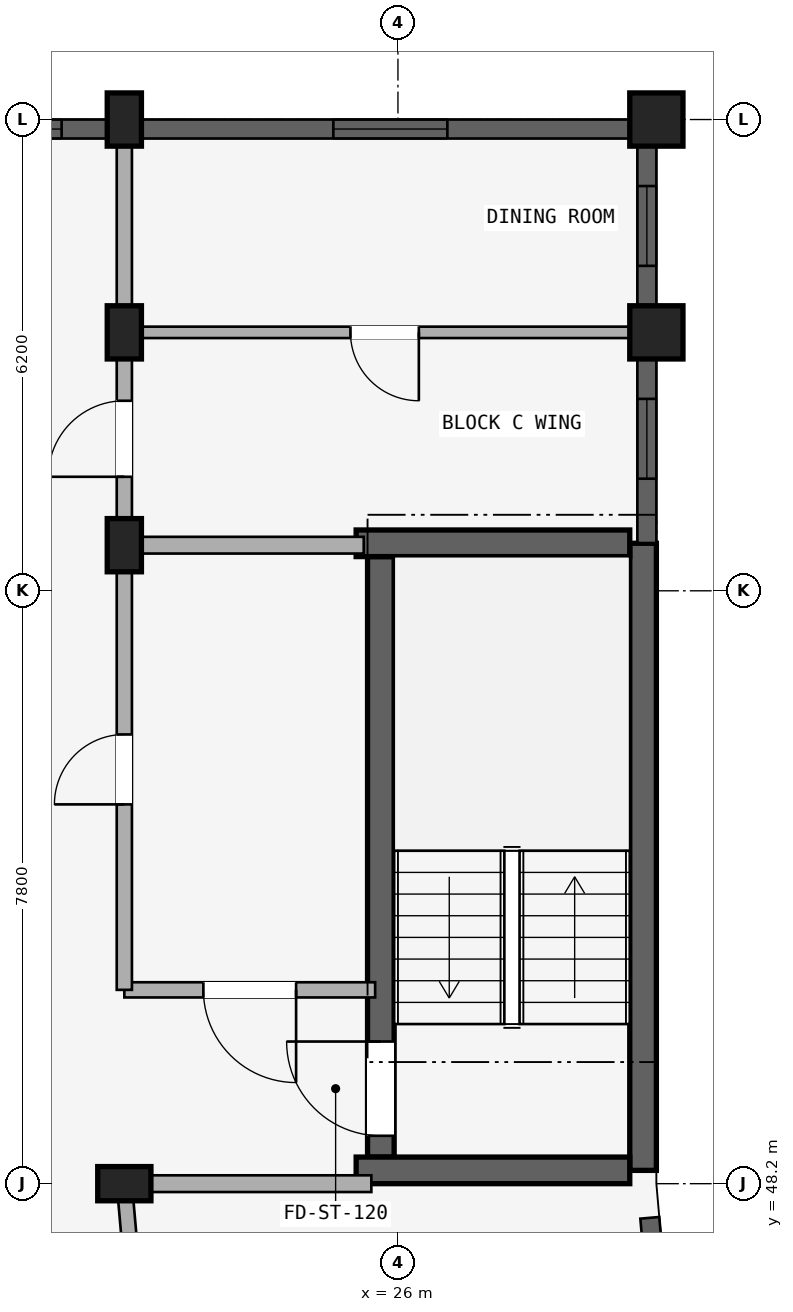
"""IFC4 building model, lengths in metres.
Left out: names, types, materials, properties, quantities, classifications, styles, units other than length and angle.
Written with IfcOpenShell. Run it as: python <this file> out.ifc"""

import sys

from ifc_helpers import new_model, si_unit, direction, frame, frame_2d, origin, origin_2d, place, context, subcontext, project, spatial, rectangle, extrude, element, fill, save


model = new_model("IFC4")
c1 = context("Model", 3, precision=1e-05, world=origin(), true_north=direction((0.0, 1.0)))
c2 = subcontext(c1, "Body", "Model", "MODEL_VIEW")
j1 = project(units=[si_unit("LENGTHUNIT", "METRE"), si_unit("PLANEANGLEUNIT", "RADIAN")], contexts=[c1])
p1 = place(None, origin())
s1 = spatial("IfcSite", under=j1, at=p1, CompositionType="ELEMENT")
p2 = place(p1, origin())
s2 = spatial("IfcBuilding", under=s1, at=p2, CompositionType="ELEMENT")
p3 = place(p2, frame((0.0, 0.0, 21.3)))
s3 = spatial("IfcBuildingStorey", under=s2, at=p3, CompositionType="ELEMENT", Elevation=21.3)
p4 = place(p3, frame((29.225, 48.375, 0.0), z_axis=(0.0, 0.0, 1.0), x_axis=(0.0, 1.0, 0.0)))
e1 = element("IfcWall", 1, at=p4, inside=s3, PredefinedType="SHEAR", context=c2, shape_type="SweptSolid", body=[
    extrude(rectangle(XDim=8.25, YDim=0.35, at=frame_2d((4.125, 0.0))), origin(), (0.0, 0.0, 1.0), 2.93),
])
p5 = place(p3, frame((25.775, 48.55, 0.0), z_axis=(0.0, 0.0, 1.0), x_axis=(0.0, 1.0, 0.0)))
e2 = element("IfcWall", 2, at=p5, inside=s3, PredefinedType="SHEAR", context=c2, shape_type="SweptSolid", body=[
    extrude(rectangle(XDim=7.9, YDim=0.35, at=frame_2d((3.95, 0.0))), origin(), (0.0, 0.0, 1.0), 2.93),
])
p6 = place(p5, frame((0.28, 0.0, 0.0)))
e3 = element("IfcOpeningElement", 3, at=p6, cuts=e2, PredefinedType="OPENING", context=c2, shape_type="SweptSolid", body=[
    extrude(rectangle(XDim=1.24, YDim=2.15, at=frame_2d((0.62, 1.075))), frame((0.0, 0.185, 0.0), z_axis=(0.0, -1.0, 0.0), x_axis=(1.0, 0.0, 0.0)), (0.0, 0.0, 1.0), 0.37),
])
for number, where, z_axis, x_axis in (
    (4, (29.05, 48.375, 0.0), (0.0, 0.0, 1.0), (-1.0, 0.0, 0.0)),
    (5, (29.05, 56.625, 0.0), (0.0, 0.0, 1.0), (-1.0, 0.0, 0.0)),
):
    element("IfcWall", number, at=place(p3, frame(where, z_axis=z_axis, x_axis=x_axis)), inside=s3, PredefinedType="SHEAR", context=c2, shape_type="SweptSolid", body=[
        extrude(rectangle(XDim=3.6, YDim=0.35, at=frame_2d((1.8, 0.0))), origin(), (0.0, 0.0, 1.0), 2.93),
    ])
for number, where, z_axis, x_axis in (
    (6, (22.4, 48.2, 0.0), (0.0, 0.0, 1.0), (0.0, 1.0, 0.0)),
    (7, (22.4, 56.6, 0.0), (0.0, 0.0, 1.0), (1.0, 0.0, 0.0)),
):
    element("IfcColumn", number, at=place(p3, frame(where, z_axis=z_axis, x_axis=x_axis)), inside=s3, PredefinedType="COLUMN", context=c2, shape_type="SweptSolid", body=[
        extrude(rectangle(XDim=0.45, YDim=0.7, at=origin_2d()), origin(), (0.0, 0.0, 1.0), 2.93),
    ])
p7 = place(p3, frame((29.4, 59.4, 0.0), z_axis=(0.0, 0.0, 1.0), x_axis=(1.0, 0.0, 0.0)))
e8 = element("IfcColumn", 8, at=p7, inside=s3, PredefinedType="COLUMN", context=c2, shape_type="SweptSolid", body=[
    extrude(rectangle(XDim=0.7, YDim=0.7, at=origin_2d()), origin(), (0.0, 0.0, 1.0), 2.93),
])
p8 = place(p3, frame((22.4, 59.4, 0.0), z_axis=(0.0, 0.0, 1.0), x_axis=(1.0, 0.0, 0.0)))
e9 = element("IfcColumn", 9, at=p8, inside=s3, PredefinedType="COLUMN", context=c2, shape_type="SweptSolid", body=[
    extrude(rectangle(XDim=0.45, YDim=0.7, at=origin_2d()), origin(), (0.0, 0.0, 1.0), 2.93),
])
p9 = place(p3, frame((29.4, 62.2, 0.0), z_axis=(0.0, 0.0, 1.0), x_axis=(1.0, 0.0, 0.0)))
e10 = element("IfcColumn", 10, at=p9, inside=s3, PredefinedType="COLUMN", context=c2, shape_type="SweptSolid", body=[
    extrude(rectangle(XDim=0.7, YDim=0.7, at=origin_2d()), origin(), (0.0, 0.0, 1.0), 2.93),
])
p10 = place(p3, frame((22.4, 62.2, 0.0), z_axis=(0.0, 0.0, 1.0), x_axis=(1.0, 0.0, 0.0)))
e11 = element("IfcColumn", 11, at=p10, inside=s3, PredefinedType="COLUMN", context=c2, shape_type="SweptSolid", body=[
    extrude(rectangle(XDim=0.45, YDim=0.7, at=origin_2d()), origin(), (0.0, 0.0, 1.0), 2.93),
])
p11 = place(p3, frame((25.7, 50.75, 0.0), z_axis=(0.0, 0.0, 1.0), x_axis=(-1.0, 0.0, 0.0)))
e12 = element("IfcWall", 12, at=p11, inside=s3, PredefinedType="STANDARD", context=c2, shape_type="SweptSolid", body=[
    extrude(rectangle(XDim=3.3, YDim=0.2, at=frame_2d((1.65, 0.0))), origin(), (0.0, 0.0, 1.0), 2.372),
])
p12 = place(p11, frame((1.04, 0.0, 0.0)))
e13 = element("IfcOpeningElement", 13, at=p12, cuts=e12, PredefinedType="OPENING", context=c2, shape_type="SweptSolid", body=[
    extrude(rectangle(XDim=1.22, YDim=2.15, at=frame_2d((0.61, 1.075))), frame((0.0, 0.11, 0.0), z_axis=(0.0, -1.0, 0.0), x_axis=(1.0, 0.0, 0.0)), (0.0, 0.0, 1.0), 0.22),
])
p13 = place(p3, frame((22.4, 50.75, 0.0), z_axis=(0.0, 0.0, 1.0), x_axis=(0.0, 1.0, 0.0)))
e14 = element("IfcWall", 14, at=p13, inside=s3, PredefinedType="STANDARD", context=c2, shape_type="SweptSolid", body=[
    extrude(rectangle(XDim=5.8, YDim=0.2, at=frame_2d((2.9, 0.0))), origin(), (0.0, 0.0, 1.0), 2.372),
])
p14 = place(p13, frame((2.44, 0.0, 0.0)))
e15 = element("IfcOpeningElement", 15, at=p14, cuts=e14, PredefinedType="OPENING", context=c2, shape_type="SweptSolid", body=[
    extrude(rectangle(XDim=0.92, YDim=2.1, at=frame_2d((0.46, 1.05))), frame((0.0, 0.11, 0.0), z_axis=(0.0, -1.0, 0.0), x_axis=(1.0, 0.0, 0.0)), (0.0, 0.0, 1.0), 0.22),
])
p15 = place(p3, frame((22.792, 43.72, 0.0), z_axis=(0.0, 0.0, 1.0), x_axis=(-0.087187153726, 0.996191949488, 0.0)))
e16 = element("IfcWall", 16, at=p15, inside=s3, PredefinedType="STANDARD", context=c2, shape_type="SweptSolid", body=[
    extrude(rectangle(XDim=4.497, YDim=0.2, at=frame_2d((2.249, 0.0))), origin(), (0.0, 0.0, 1.0), 2.372),
])
p16 = place(p3, frame((25.65, 48.2, 0.0), z_axis=(0.0, 0.0, 1.0), x_axis=(-1.0, 0.0, 0.0)))
e17 = element("IfcWall", 17, at=p16, inside=s3, PredefinedType="STANDARD", context=c2, shape_type="SweptSolid", body=[
    extrude(rectangle(XDim=3.2, YDim=0.22, at=frame_2d((1.6, 0.0))), origin(), (0.0, 0.0, 1.0), 2.372),
])
p17 = place(p3, frame((22.4, 56.6, 0.0), z_axis=(0.0, 0.0, 1.0), x_axis=(0.0, 1.0, 0.0)))
e18 = element("IfcWall", 18, at=p17, inside=s3, PredefinedType="STANDARD", context=c2, shape_type="SweptSolid", body=[
    extrude(rectangle(XDim=2.8, YDim=0.2, at=frame_2d((1.4, 0.0))), origin(), (0.0, 0.0, 1.0), 2.372),
])
p18 = place(p17, frame((0.9, 0.0, 0.0)))
e19 = element("IfcOpeningElement", 19, at=p18, cuts=e18, PredefinedType="OPENING", context=c2, shape_type="SweptSolid", body=[
    extrude(rectangle(XDim=1.0, YDim=2.15, at=frame_2d((0.5, 1.075))), frame((0.0, 0.11, 0.0), z_axis=(0.0, -1.0, 0.0), x_axis=(1.0, 0.0, 0.0)), (0.0, 0.0, 1.0), 0.22),
])
p19 = place(p3, frame((25.55, 56.6, 0.0), z_axis=(0.0, 0.0, 1.0), x_axis=(-1.0, 0.0, 0.0)))
e20 = element("IfcWall", 20, at=p19, inside=s3, PredefinedType="STANDARD", context=c2, shape_type="SweptSolid", body=[
    extrude(rectangle(XDim=3.1, YDim=0.22, at=frame_2d((1.55, 0.0))), origin(), (0.0, 0.0, 1.0), 2.372),
])
p20 = place(p3, frame((22.4, 59.4, 0.0), z_axis=(0.0, 0.0, 1.0), x_axis=(0.0, 1.0, 0.0)))
e21 = element("IfcWall", 21, at=p20, inside=s3, PredefinedType="STANDARD", context=c2, shape_type="SweptSolid", body=[
    extrude(rectangle(XDim=2.8, YDim=0.2, at=frame_2d((1.4, 0.0))), origin(), (0.0, 0.0, 1.0), 2.372),
])
p21 = place(p3, frame((29.2, 59.4, 0.0), z_axis=(0.0, 0.0, 1.0), x_axis=(-1.0, 0.0, 0.0)))
e22 = element("IfcWall", 22, at=p21, inside=s3, PredefinedType="PARTITIONING", context=c2, shape_type="SweptSolid", body=[
    extrude(rectangle(XDim=6.75, YDim=0.15, at=frame_2d((3.375, 0.0))), origin(), (0.0, 0.0, 1.0), 2.372),
])
p22 = place(p21, frame((2.925, 0.0, 0.0)))
e23 = element("IfcOpeningElement", 23, at=p22, cuts=e22, PredefinedType="OPENING", context=c2, shape_type="SweptSolid", body=[
    extrude(rectangle(XDim=0.9, YDim=2.1, at=frame_2d((0.45, 1.05))), frame((0.0, 0.085, 0.0), z_axis=(0.0, -1.0, 0.0), x_axis=(1.0, 0.0, 0.0)), (0.0, 0.0, 1.0), 0.17),
])
p23 = place(p3, frame((29.539, 45.177, 0.0), z_axis=(0.0, 0.0, 1.0), x_axis=(-0.087229084652, 0.996188278786, 0.0)))
e24 = element("IfcWall", 24, at=p23, inside=s3, PredefinedType="STANDARD", context=c2, shape_type="SweptSolid", body=[
    extrude(rectangle(XDim=2.583, YDim=0.25, at=frame_2d((1.292, 0.0))), origin(), (0.0, 0.0, 1.0), 2.472),
])
p24 = place(p23, frame((0.785, 0.0, 0.772)))
e25 = element("IfcOpeningElement", 25, at=p24, cuts=e24, PredefinedType="OPENING", context=c2, shape_type="SweptSolid", body=[
    extrude(rectangle(XDim=1.2, YDim=1.5, at=frame_2d((0.6, 0.75))), frame((0.0, 0.135, 0.0), z_axis=(0.0, -1.0, 0.0), x_axis=(1.0, 0.0, 0.0)), (0.0, 0.0, 1.0), 0.27),
])
p25 = place(p3, frame((29.275, 56.628, 0.0), z_axis=(0.0, 0.0, 1.0), x_axis=(0.0, 1.0, 0.0)))
e26 = element("IfcWall", 26, at=p25, inside=s3, PredefinedType="STANDARD", context=c2, shape_type="SweptSolid", body=[
    extrude(rectangle(XDim=2.418, YDim=0.25, at=frame_2d((1.209, 0.0))), origin(), (0.0, 0.0, 1.0), 2.472),
])
p26 = place(p25, frame((0.846, 0.0, 0.88)))
e27 = element("IfcOpeningElement", 27, at=p26, cuts=e26, PredefinedType="OPENING", context=c2, shape_type="SweptSolid", body=[
    extrude(rectangle(XDim=1.05, YDim=1.25, at=frame_2d((0.525, 0.625))), frame((0.0, 0.135, 0.0), z_axis=(0.0, -1.0, 0.0), x_axis=(1.0, 0.0, 0.0)), (0.0, 0.0, 1.0), 0.27),
])
p27 = place(p3, frame((29.275, 59.753, 0.0), z_axis=(0.0, 0.0, 1.0), x_axis=(0.0, 1.0, 0.0)))
e28 = element("IfcWall", 28, at=p27, inside=s3, PredefinedType="STANDARD", context=c2, shape_type="SweptSolid", body=[
    extrude(rectangle(XDim=2.093, YDim=0.25, at=frame_2d((1.046, 0.0))), origin(), (0.0, 0.0, 1.0), 2.472),
])
p28 = place(p27, frame((0.521, 0.0, 0.88)))
e29 = element("IfcOpeningElement", 29, at=p28, cuts=e28, PredefinedType="OPENING", context=c2, shape_type="SweptSolid", body=[
    extrude(rectangle(XDim=1.05, YDim=1.25, at=frame_2d((0.525, 0.625))), frame((0.0, 0.135, 0.0), z_axis=(0.0, -1.0, 0.0), x_axis=(1.0, 0.0, 0.0)), (0.0, 0.0, 1.0), 0.27),
])
p29 = place(p3, frame((29.046, 62.075, 0.0), z_axis=(0.0, 0.0, 1.0), x_axis=(-1.0, 0.0, 0.0)))
e30 = element("IfcWall", 30, at=p29, inside=s3, PredefinedType="STANDARD", context=c2, shape_type="SweptSolid", body=[
    extrude(rectangle(XDim=6.418, YDim=0.25, at=frame_2d((3.209, 0.0))), origin(), (0.0, 0.0, 1.0), 2.372),
])
p30 = place(p29, frame((2.396, 0.0, 0.522)))
e31 = element("IfcOpeningElement", 31, at=p30, cuts=e30, PredefinedType="OPENING", context=c2, shape_type="SweptSolid", body=[
    extrude(rectangle(XDim=1.5, YDim=1.65, at=frame_2d((0.75, 0.825))), frame((0.0, 0.135, 0.0), z_axis=(0.0, -1.0, 0.0), x_axis=(1.0, 0.0, 0.0)), (0.0, 0.0, 1.0), 0.27),
])
p31 = place(p3, frame((22.171, 62.075, 0.0), z_axis=(0.0, 0.0, 1.0), x_axis=(-1.0, 0.0, 0.0)))
e32 = element("IfcWall", 32, at=p31, inside=s3, PredefinedType="STANDARD", context=c2, shape_type="SweptSolid", body=[
    extrude(rectangle(XDim=1.943, YDim=0.25, at=frame_2d((0.971, 0.0))), origin(), (0.0, 0.0, 1.0), 2.372),
])
p32 = place(p31, frame((0.596, 0.0, 0.88)))
e33 = element("IfcOpeningElement", 33, at=p32, cuts=e32, PredefinedType="OPENING", context=c2, shape_type="SweptSolid", body=[
    extrude(rectangle(XDim=0.75, YDim=1.05, at=frame_2d((0.375, 0.525))), frame((0.0, 0.135, 0.0), z_axis=(0.0, -1.0, 0.0), x_axis=(1.0, 0.0, 0.0)), (0.0, 0.0, 1.0), 0.27),
])
p33 = place(p26, origin())
e34 = element("IfcWindow", 34, at=p33, inside=s3, PartitioningType="SINGLE_PANEL", PredefinedType="WINDOW", context=c2, shape_type="SweptSolid", body=[
    extrude(rectangle(XDim=1.05, YDim=1.25, at=frame_2d((0.525, 0.625))), frame((0.0, 0.03, 0.0), z_axis=(0.0, -1.0, 0.0), x_axis=(1.0, 0.0, 0.0)), (0.0, 0.0, 1.0), 0.06),
])
fill(e27, e34)
p34 = place(p28, origin())
e35 = element("IfcWindow", 35, at=p34, inside=s3, PartitioningType="SINGLE_PANEL", PredefinedType="WINDOW", context=c2, shape_type="SweptSolid", body=[
    extrude(rectangle(XDim=1.05, YDim=1.25, at=frame_2d((0.525, 0.625))), frame((0.0, 0.03, 0.0), z_axis=(0.0, -1.0, 0.0), x_axis=(1.0, 0.0, 0.0)), (0.0, 0.0, 1.0), 0.06),
])
fill(e29, e35)
p35 = place(p30, origin())
e36 = element("IfcWindow", 36, at=p35, inside=s3, PartitioningType="DOUBLE_PANEL_VERTICAL", PredefinedType="WINDOW", context=c2, shape_type="SweptSolid", body=[
    extrude(rectangle(XDim=1.5, YDim=1.65, at=frame_2d((0.75, 0.825))), frame((0.0, 0.03, 0.0), z_axis=(0.0, -1.0, 0.0), x_axis=(1.0, 0.0, 0.0)), (0.0, 0.0, 1.0), 0.06),
])
fill(e31, e36)
p36 = place(p32, origin())
e37 = element("IfcWindow", 37, at=p36, inside=s3, PartitioningType="SINGLE_PANEL", PredefinedType="WINDOW", context=c2, shape_type="SweptSolid", body=[
    extrude(rectangle(XDim=0.75, YDim=1.05, at=frame_2d((0.375, 0.525))), frame((0.0, 0.03, 0.0), z_axis=(0.0, -1.0, 0.0), x_axis=(1.0, 0.0, 0.0)), (0.0, 0.0, 1.0), 0.06),
])
fill(e33, e37)
p37 = place(p6, frame((1.24, 0.0, 0.0), z_axis=(0.0, 0.0, 1.0), x_axis=(-1.0, 0.0, 0.0)))
e38 = element("IfcDoor", 38, at=p37, inside=s3, OperationType="SINGLE_SWING_LEFT", PredefinedType="DOOR", context=c2, shape_type="SweptSolid", body=[
    extrude(rectangle(XDim=1.24, YDim=2.15, at=frame_2d((0.62, 1.075))), frame((0.0, 0.025, 0.0), z_axis=(0.0, -1.0, 0.0), x_axis=(1.0, 0.0, 0.0)), (0.0, 0.0, 1.0), 0.05),
])
fill(e3, e38)
p38 = place(p12, origin())
e39 = element("IfcDoor", 39, at=p38, inside=s3, OperationType="SINGLE_SWING_LEFT", PredefinedType="DOOR", context=c2, shape_type="SweptSolid", body=[
    extrude(rectangle(XDim=1.22, YDim=2.15, at=frame_2d((0.61, 1.075))), frame((0.0, 0.025, 0.0), z_axis=(0.0, -1.0, 0.0), x_axis=(1.0, 0.0, 0.0)), (0.0, 0.0, 1.0), 0.05),
])
fill(e13, e39)
p39 = place(p14, frame((0.92, 0.0, 0.0), z_axis=(0.0, 0.0, 1.0), x_axis=(-1.0, 0.0, 0.0)))
e40 = element("IfcDoor", 40, at=p39, inside=s3, OperationType="SINGLE_SWING_RIGHT", PredefinedType="DOOR", context=c2, shape_type="SweptSolid", body=[
    extrude(rectangle(XDim=0.92, YDim=2.1, at=frame_2d((0.46, 1.05))), frame((0.0, 0.025, 0.0), z_axis=(0.0, -1.0, 0.0), x_axis=(1.0, 0.0, 0.0)), (0.0, 0.0, 1.0), 0.05),
])
fill(e15, e40)
p40 = place(p18, frame((1.0, 0.0, 0.0), z_axis=(0.0, 0.0, 1.0), x_axis=(-1.0, 0.0, 0.0)))
e41 = element("IfcDoor", 41, at=p40, inside=s3, OperationType="SINGLE_SWING_RIGHT", PredefinedType="DOOR", context=c2, shape_type="SweptSolid", body=[
    extrude(rectangle(XDim=1.0, YDim=2.15, at=frame_2d((0.5, 1.075))), frame((0.0, 0.025, 0.0), z_axis=(0.0, -1.0, 0.0), x_axis=(1.0, 0.0, 0.0)), (0.0, 0.0, 1.0), 0.05),
])
fill(e19, e41)
p41 = place(p22, frame((0.9, 0.0, 0.0), z_axis=(0.0, 0.0, 1.0), x_axis=(-1.0, 0.0, 0.0)))
e42 = element("IfcDoor", 42, at=p41, inside=s3, OperationType="SINGLE_SWING_RIGHT", PredefinedType="DOOR", context=c2, shape_type="SweptSolid", body=[
    extrude(rectangle(XDim=0.9, YDim=2.1, at=frame_2d((0.45, 1.05))), frame((0.0, 0.025, 0.0), z_axis=(0.0, -1.0, 0.0), x_axis=(1.0, 0.0, 0.0)), (0.0, 0.0, 1.0), 0.05),
])
fill(e23, e42)
save(model, sys.argv[1])
